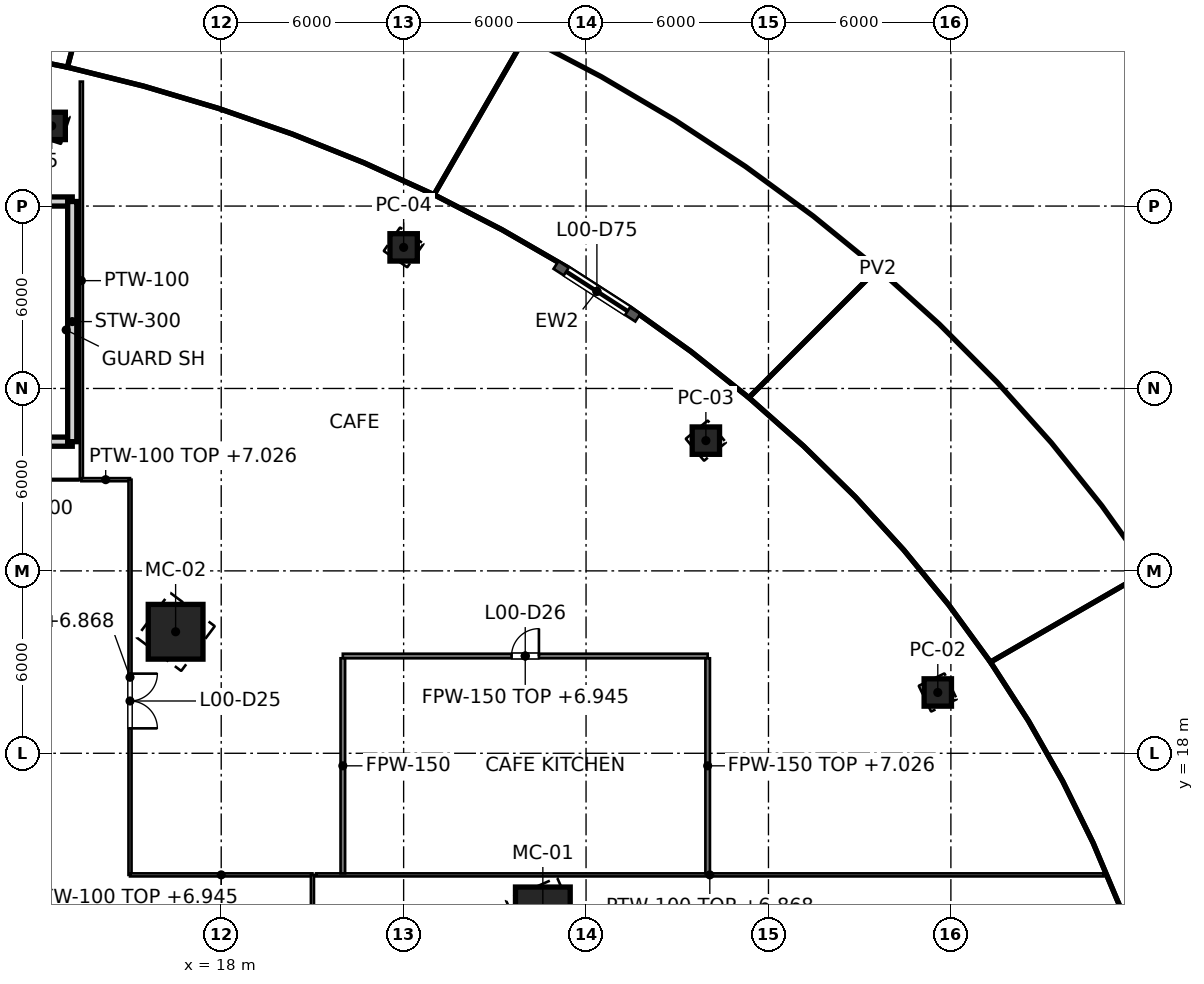
"""IFC4 building model, lengths in metres.
Left out: names, types, materials, properties, quantities, classifications, styles, units other than length and angle.
Written with IfcOpenShell. Run it as: python <this file> out.ifc"""

import sys

from ifc_helpers import new_model, si_unit, direction, frame, frame_2d, origin, origin_2d, place, context, subcontext, project, spatial, rectangle, hollow_rectangle, extrude, element, fill, save


model = new_model("IFC4")
c1 = context("Model", 3, precision=1e-05, world=origin(), true_north=direction((0.0, 1.0)))
c2 = subcontext(c1, "Body", "Model", "MODEL_VIEW")
j1 = project(units=[si_unit("LENGTHUNIT", "METRE"), si_unit("PLANEANGLEUNIT", "RADIAN")], contexts=[c1])
p1 = place(None, origin())
s1 = spatial("IfcSite", under=j1, at=p1, CompositionType="ELEMENT")
p2 = place(p1, origin())
s2 = spatial("IfcBuilding", under=s1, at=p2, CompositionType="ELEMENT")
p3 = place(p2, origin())
s3 = spatial("IfcBuildingStorey", under=s2, at=p3, CompositionType="ELEMENT", Elevation=0.0)
for number, where, z_axis, x_axis in (
    (1, (28.579, 12.7, 0.0), (0.0, 0.0, 1.0), (0.914, 0.406, 0.0)),
    (2, (16.5, 21.997, 0.0), (0.0, 0.0, 1.0), (0.6, 0.8, 0.0)),
):
    element("IfcColumn", number, at=place(p3, frame(where, z_axis=z_axis, x_axis=x_axis)), inside=s3, PredefinedType="COLUMN", context=c2, shape_type="SweptSolid", body=[
        extrude(hollow_rectangle(XDim=1.8, YDim=1.8, WallThickness=0.08, at=origin_2d()), origin(), (0.0, 0.0, 1.0), 8.0),
    ])
for number, where, z_axis, x_axis in (
    (3, (41.569, 20.0, 0.0), (0.0, 0.0, 1.0), (0.901, 0.434, 0.0)),
    (4, (33.941, 28.284, 0.0), (0.0, 0.0, 1.0), (0.768, 0.64, 0.0)),
    (5, (24.0, 34.641, 0.0), (0.0, 0.0, 1.0), (0.569, 0.822, 0.0)),
    (6, (12.423, 38.637, 0.0), (0.0, 0.0, 1.0), (0.306, 0.952, 0.0)),
):
    element("IfcColumn", number, at=place(p3, frame(where, z_axis=z_axis, x_axis=x_axis)), inside=s3, PredefinedType="COLUMN", context=c2, shape_type="SweptSolid", body=[
        extrude(hollow_rectangle(XDim=0.9, YDim=0.9, WallThickness=0.04, at=origin_2d()), origin(), (0.0, 0.0, 1.0), 8.0),
    ])
p4 = place(p3, frame((31.702, 32.328, 0.0), z_axis=(0.0, 0.0, 1.0), x_axis=(-0.840530889262, 0.541763623913, 0.0)))
e7 = element("IfcWall", 7, at=p4, inside=s3, PredefinedType="SOLIDWALL", context=c2, shape_type="SweptSolid", body=[
    extrude(rectangle(XDim=3.2, YDim=0.3, at=frame_2d((1.6, 0.0))), origin(), (0.0, 0.0, 1.0), 7.8),
])
p5 = place(p4, frame((0.4, 0.0, 0.0)))
e8 = element("IfcOpeningElement", 8, at=p5, cuts=e7, PredefinedType="OPENING", context=c2, shape_type="SweptSolid", body=[
    extrude(rectangle(XDim=2.4, YDim=2.4, at=frame_2d((1.2, 1.2))), frame((0.0, 0.15, 0.0), z_axis=(0.0, -1.0, 0.0), x_axis=(1.0, 0.0, 0.0)), (0.0, 0.0, 1.0), 0.3),
])
p6 = place(p3, frame((13.1, 28.25, 0.0), z_axis=(0.0, 0.0, 1.0), x_axis=(-1.0, 0.0, 0.0)))
e9 = element("IfcWall", 9, at=p6, inside=s3, PredefinedType="SOLIDWALL", context=c2, shape_type="SweptSolid", body=[
    extrude(rectangle(XDim=4.9, YDim=0.3, at=frame_2d((2.45, 0.0))), origin(), (0.0, 0.0, 1.0), 7.8),
])
p7 = place(p6, frame((1.85, 0.0, 0.0)))
e10 = element("IfcOpeningElement", 10, at=p7, cuts=e9, PredefinedType="OPENING", context=c2, shape_type="SweptSolid", body=[
    extrude(rectangle(XDim=1.2, YDim=2.1, at=frame_2d((0.6, 1.05))), frame((0.0, 0.15, 0.0), z_axis=(0.0, -1.0, 0.0), x_axis=(1.0, 0.0, 0.0)), (0.0, 0.0, 1.0), 0.3),
])
p8 = place(p3, frame((8.2, 36.15, 0.0), z_axis=(0.0, 0.0, 1.0), x_axis=(1.0, 0.0, 0.0)))
e11 = element("IfcWall", 11, at=p8, inside=s3, PredefinedType="SOLIDWALL", context=c2, shape_type="SweptSolid", body=[
    extrude(rectangle(XDim=4.9, YDim=0.3, at=frame_2d((2.45, 0.0))), origin(), (0.0, 0.0, 1.0), 7.8),
])
p9 = place(p3, frame((13.1, 36.15, 0.0), z_axis=(0.0, 0.0, 1.0), x_axis=(0.0, -1.0, 0.0)))
e12 = element("IfcWall", 12, at=p9, inside=s3, PredefinedType="SOLIDWALL", context=c2, shape_type="SweptSolid", body=[
    extrude(rectangle(XDim=7.9, YDim=0.3, at=frame_2d((3.95, 0.0))), origin(), (0.0, 0.0, 1.0), 7.8),
])
p10 = place(p3, frame((13.4, 40.094, 0.0), z_axis=(0.0, 0.0, 1.0), x_axis=(0.0, -1.0, 0.0)))
e13 = element("IfcWall", 13, at=p10, inside=s3, PredefinedType="PARTITIONING", context=c2, shape_type="SweptSolid", body=[
    extrude(rectangle(XDim=13.094, YDim=0.1, at=frame_2d((6.547, 0.0))), origin(), (0.0, 0.0, 1.0), 6.877),
])
p11 = place(p3, frame((13.4, 27.0, 0.0), z_axis=(0.0, 0.0, 1.0), x_axis=(1.0, 0.0, 0.0)))
e14 = element("IfcWall", 14, at=p11, inside=s3, PredefinedType="PARTITIONING", context=c2, shape_type="SweptSolid", body=[
    extrude(rectangle(XDim=1.6, YDim=0.1, at=frame_2d((0.8, 0.0))), origin(), (0.0, 0.0, 1.0), 7.026),
])
p12 = place(p3, frame((15.0, 27.0, 0.0), z_axis=(0.0, 0.0, 1.0), x_axis=(0.0, -1.0, 0.0)))
e15 = element("IfcWall", 15, at=p12, inside=s3, PredefinedType="PARTITIONING", context=c2, shape_type="SweptSolid", body=[
    extrude(rectangle(XDim=13.0, YDim=0.1, at=frame_2d((6.5, 0.0))), origin(), (0.0, 0.0, 1.0), 6.868),
])
p13 = place(p12, frame((6.38, 0.0, 0.0)))
e16 = element("IfcOpeningElement", 16, at=p13, cuts=e15, PredefinedType="OPENING", context=c2, shape_type="SweptSolid", body=[
    extrude(rectangle(XDim=1.8, YDim=2.1, at=frame_2d((0.9, 1.05))), frame((0.0, 0.05, 0.0), z_axis=(0.0, -1.0, 0.0), x_axis=(1.0, 0.0, 0.0)), (0.0, 0.0, 1.0), 0.1),
])
p14 = place(p3, frame((15.0, 14.0, 0.0), z_axis=(0.0, 0.0, 1.0), x_axis=(1.0, 0.0, 0.0)))
e17 = element("IfcWall", 17, at=p14, inside=s3, PredefinedType="PARTITIONING", context=c2, shape_type="SweptSolid", body=[
    extrude(rectangle(XDim=6.0, YDim=0.1, at=frame_2d((3.0, 0.0))), origin(), (0.0, 0.0, 1.0), 6.945),
])
p15 = place(p3, frame((21.0, 14.0, 0.0), z_axis=(0.0, 0.0, 1.0), x_axis=(0.0, -1.0, 0.0)))
e18 = element("IfcWall", 18, at=p15, inside=s3, PredefinedType="PARTITIONING", context=c2, shape_type="SweptSolid", body=[
    extrude(rectangle(XDim=28.0, YDim=0.1, at=frame_2d((14.0, 0.0))), origin(), (0.0, 0.0, 1.0), 6.877),
])
p16 = place(p15, frame((23.1, 0.0, 0.0)))
e19 = element("IfcOpeningElement", 19, at=p16, cuts=e18, PredefinedType="OPENING", context=c2, shape_type="SweptSolid", body=[
    extrude(rectangle(XDim=1.8, YDim=2.1, at=frame_2d((0.9, 1.05))), frame((0.0, 0.05, 0.0), z_axis=(0.0, -1.0, 0.0), x_axis=(1.0, 0.0, 0.0)), (0.0, 0.0, 1.0), 0.1),
])
p17 = place(p15, frame((16.55, 0.0, 0.0)))
e20 = element("IfcOpeningElement", 20, at=p17, cuts=e18, PredefinedType="OPENING", context=c2, shape_type="SweptSolid", body=[
    extrude(rectangle(XDim=0.9, YDim=2.1, at=frame_2d((0.45, 1.05))), frame((0.0, 0.05, 0.0), z_axis=(0.0, -1.0, 0.0), x_axis=(1.0, 0.0, 0.0)), (0.0, 0.0, 1.0), 0.1),
])
p18 = place(p15, frame((11.95, 0.0, 0.0)))
e21 = element("IfcOpeningElement", 21, at=p18, cuts=e18, PredefinedType="OPENING", context=c2, shape_type="SweptSolid", body=[
    extrude(rectangle(XDim=0.9, YDim=2.1, at=frame_2d((0.45, 1.05))), frame((0.0, 0.05, 0.0), z_axis=(0.0, -1.0, 0.0), x_axis=(1.0, 0.0, 0.0)), (0.0, 0.0, 1.0), 0.1),
])
p19 = place(p15, frame((7.35, 0.0, 0.0)))
e22 = element("IfcOpeningElement", 22, at=p19, cuts=e18, PredefinedType="OPENING", context=c2, shape_type="SweptSolid", body=[
    extrude(rectangle(XDim=0.9, YDim=2.1, at=frame_2d((0.45, 1.05))), frame((0.0, 0.05, 0.0), z_axis=(0.0, -1.0, 0.0), x_axis=(1.0, 0.0, 0.0)), (0.0, 0.0, 1.0), 0.1),
])
p20 = place(p3, frame((-13.304, 27.0, 0.0), z_axis=(0.0, 0.0, 1.0), x_axis=(1.0, 0.0, 0.0)))
e23 = element("IfcWall", 23, at=p20, inside=s3, PredefinedType="PARTITIONING", context=c2, shape_type="SweptSolid", body=[
    extrude(rectangle(XDim=26.608, YDim=0.05, at=frame_2d((13.304, 0.0))), origin(), (0.0, 0.0, 1.0), 7.026),
])
p21 = place(p20, frame((3.796, 0.0, 0.0)))
e24 = element("IfcOpeningElement", 24, at=p21, cuts=e23, PredefinedType="OPENING", context=c2, shape_type="SweptSolid", body=[
    extrude(rectangle(XDim=2.7, YDim=2.4, at=frame_2d((1.35, 1.2))), frame((0.0, 0.025, 0.0), z_axis=(0.0, -1.0, 0.0), x_axis=(1.0, 0.0, 0.0)), (0.0, 0.0, 1.0), 0.05),
])
p22 = place(p20, frame((14.868, 0.0, 0.0)))
e25 = element("IfcOpeningElement", 25, at=p22, cuts=e23, PredefinedType="OPENING", context=c2, shape_type="SweptSolid", body=[
    extrude(rectangle(XDim=2.7, YDim=2.4, at=frame_2d((1.35, 1.2))), frame((0.0, 0.025, 0.0), z_axis=(0.0, -1.0, 0.0), x_axis=(1.0, 0.0, 0.0)), (0.0, 0.0, 1.0), 0.05),
])
p23 = place(p20, frame((20.112, 0.0, 0.0)))
e26 = element("IfcOpeningElement", 26, at=p23, cuts=e23, PredefinedType="OPENING", context=c2, shape_type="SweptSolid", body=[
    extrude(rectangle(XDim=2.7, YDim=2.4, at=frame_2d((1.35, 1.2))), frame((0.0, 0.025, 0.0), z_axis=(0.0, -1.0, 0.0), x_axis=(1.0, 0.0, 0.0)), (0.0, 0.0, 1.0), 0.05),
])
p24 = place(p3, frame((21.121, 14.0, 0.0), z_axis=(0.0, 0.0, 1.0), x_axis=(1.0, 0.0, 0.0)))
e27 = element("IfcWall", 27, at=p24, inside=s3, PredefinedType="PARTITIONING", context=c2, shape_type="SweptSolid", body=[
    extrude(rectangle(XDim=25.9, YDim=0.1, at=frame_2d((12.95, 0.0))), origin(), (0.0, 0.0, 1.0), 6.868),
])
p25 = place(p3, frame((22.0, 21.2, 0.0), z_axis=(0.0, 0.0, 1.0), x_axis=(1.0, 0.0, 0.0)))
e28 = element("IfcWall", 28, at=p25, inside=s3, PredefinedType="PARTITIONING", context=c2, shape_type="SweptSolid", body=[
    extrude(rectangle(XDim=12.0, YDim=0.15, at=frame_2d((6.0, 0.0))), origin(), (0.0, 0.0, 1.0), 6.945),
])
p26 = place(p25, frame((5.55, 0.0, 0.0)))
e29 = element("IfcOpeningElement", 29, at=p26, cuts=e28, PredefinedType="OPENING", context=c2, shape_type="SweptSolid", body=[
    extrude(rectangle(XDim=0.9, YDim=2.1, at=frame_2d((0.45, 1.05))), frame((0.0, 0.075, 0.0), z_axis=(0.0, -1.0, 0.0), x_axis=(1.0, 0.0, 0.0)), (0.0, 0.0, 1.0), 0.15),
])
p27 = place(p3, frame((22.0, 14.05, 0.0), z_axis=(0.0, 0.0, 1.0), x_axis=(0.0, 1.0, 0.0)))
e30 = element("IfcWall", 30, at=p27, inside=s3, PredefinedType="PARTITIONING", context=c2, shape_type="SweptSolid", body=[
    extrude(rectangle(XDim=7.075, YDim=0.15, at=frame_2d((3.538, 0.0))), origin(), (0.0, 0.0, 1.0), 6.868),
])
p28 = place(p3, frame((34.0, 14.05, 0.0), z_axis=(0.0, 0.0, 1.0), x_axis=(0.0, 1.0, 0.0)))
e31 = element("IfcWall", 31, at=p28, inside=s3, PredefinedType="PARTITIONING", context=c2, shape_type="SweptSolid", body=[
    extrude(rectangle(XDim=7.075, YDim=0.15, at=frame_2d((3.538, 0.0))), origin(), (0.0, 0.0, 1.0), 7.026),
])
p29 = place(p5, origin())
e32 = element("IfcDoor", 32, at=p29, inside=s3, OperationType="DOUBLE_DOOR_SLIDING", PredefinedType="DOOR", context=c2, shape_type="SweptSolid", body=[
    extrude(rectangle(XDim=2.4, YDim=2.4, at=frame_2d((1.2, 1.2))), frame((0.0, 0.025, 0.0), z_axis=(0.0, -1.0, 0.0), x_axis=(1.0, 0.0, 0.0)), (0.0, 0.0, 1.0), 0.05),
])
fill(e8, e32)
p30 = place(p13, origin())
e33 = element("IfcDoor", 33, at=p30, inside=s3, OperationType="DOUBLE_DOOR_SINGLE_SWING", PredefinedType="DOOR", context=c2, shape_type="SweptSolid", body=[
    extrude(rectangle(XDim=1.8, YDim=2.1, at=frame_2d((0.9, 1.05))), frame((0.0, 0.025, 0.0), z_axis=(0.0, -1.0, 0.0), x_axis=(1.0, 0.0, 0.0)), (0.0, 0.0, 1.0), 0.05),
])
fill(e16, e33)
p31 = place(p26, origin())
e34 = element("IfcDoor", 34, at=p31, inside=s3, OperationType="SINGLE_SWING_RIGHT", PredefinedType="DOOR", context=c2, shape_type="SweptSolid", body=[
    extrude(rectangle(XDim=0.9, YDim=2.1, at=frame_2d((0.45, 1.05))), frame((0.0, 0.025, 0.0), z_axis=(0.0, -1.0, 0.0), x_axis=(1.0, 0.0, 0.0)), (0.0, 0.0, 1.0), 0.05),
])
fill(e29, e34)
save(model, sys.argv[1])
